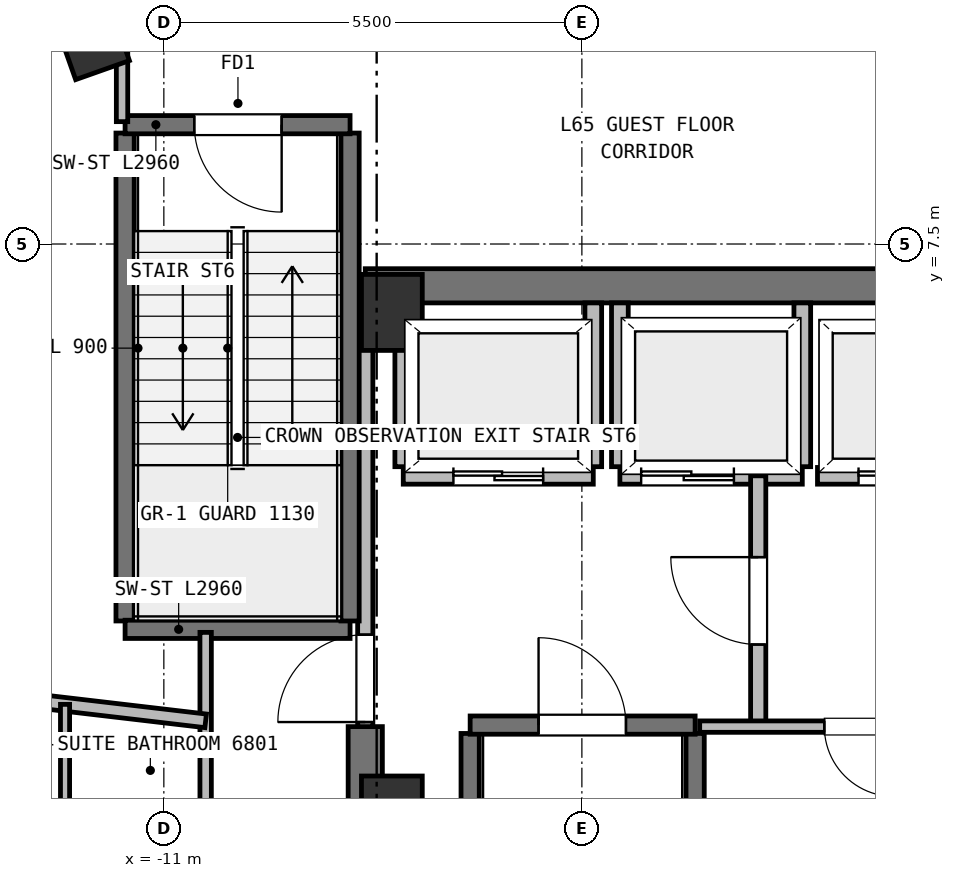
"""IFC4 building model, lengths in metres.
Left out: names, types, materials, properties, quantities, classifications, styles, units other than length and angle.
Written with IfcOpenShell. Run it as: python <this file> out.ifc"""

import sys

from ifc_helpers import new_model, si_unit, direction, frame, frame_2d, origin, origin_2d, place, context, subcontext, project, spatial, rectangle, extrude, element, fill, save


model = new_model("IFC4")
c1 = context("Model", 3, precision=1e-05, world=origin(), true_north=direction((0.0, 1.0)))
c2 = subcontext(c1, "Body", "Model", "MODEL_VIEW")
j1 = project(units=[si_unit("LENGTHUNIT", "METRE"), si_unit("PLANEANGLEUNIT", "RADIAN")], contexts=[c1])
p1 = place(None, origin())
s1 = spatial("IfcSite", under=j1, at=p1, CompositionType="ELEMENT")
p2 = place(p1, origin())
s2 = spatial("IfcBuilding", under=s1, at=p2, CompositionType="ELEMENT")
p3 = place(p2, frame((0.0, 0.0, 260.2)))
s3 = spatial("IfcBuildingStorey", under=s2, at=p3, CompositionType="ELEMENT", Elevation=260.2)
for number, where, z_axis, x_axis in (
    (1, (-8.0, 6.6, 0.0), (0.0, 0.0, 1.0), (1.0, 0.0, 0.0)),
    (2, (-8.0, 0.0, 0.0), (0.0, 0.0, 1.0), (1.0, 0.0, 0.0)),
):
    element("IfcColumn", number, at=place(p3, frame(where, z_axis=z_axis, x_axis=x_axis)), inside=s3, PredefinedType="COLUMN", context=c2, shape_type="SweptSolid", body=[
        extrude(rectangle(XDim=0.8, YDim=1.0, at=origin_2d()), origin(), (0.0, 0.0, 1.0), 4.2),
    ])
p4 = place(p3, frame((-8.35, 6.95, 0.0), z_axis=(0.0, 0.0, 1.0), x_axis=(1.0, 0.0, 0.0)))
e3 = element("IfcWall", 3, at=p4, inside=s3, PredefinedType="SHEAR", context=c2, shape_type="SweptSolid", body=[
    extrude(rectangle(XDim=16.7, YDim=0.45, at=frame_2d((8.35, 0.0))), origin(), (0.0, 0.0, 1.0), 3.95),
])
p5 = place(p3, frame((-8.35, -6.95, 0.0), z_axis=(0.0, 0.0, 1.0), x_axis=(0.0, 1.0, 0.0)))
e4 = element("IfcWall", 4, at=p5, inside=s3, PredefinedType="SHEAR", context=c2, shape_type="SweptSolid", body=[
    extrude(rectangle(XDim=8.1, YDim=0.45, at=frame_2d((4.05, 0.0))), origin(), (0.0, 0.0, 1.0), 3.95),
])
p6 = place(p3, frame((-11.957, 10.212, 0.0), z_axis=(0.0, 0.0, 1.0), x_axis=(0.942641491092, 0.333806859234, 0.0)))
e5 = element("IfcColumn", 5, at=p6, inside=s3, PredefinedType="COLUMN", context=c2, shape_type="SweptSolid", body=[
    extrude(rectangle(XDim=0.75, YDim=0.9, at=origin_2d()), origin(), (0.0, 0.0, 1.0), 4.2),
])
for number, where, z_axis, x_axis in (
    (6, (-6.97, -6.16, 0.0), (0.0, 0.0, 1.0), (0.0, 1.0, 0.0)),
    (7, (-4.01, -6.16, 0.0), (0.0, 0.0, 1.0), (0.0, 1.0, 0.0)),
):
    element("IfcWall", number, at=place(p3, frame(where, z_axis=z_axis, x_axis=x_axis)), inside=s3, PredefinedType="SHEAR", context=c2, shape_type="SweptSolid", body=[
        extrude(rectangle(XDim=7.22, YDim=0.24, at=frame_2d((3.61, 0.0))), origin(), (0.0, 0.0, 1.0), 3.95),
    ])
p7 = place(p3, frame((-6.97, 1.17, 0.0), z_axis=(0.0, 0.0, 1.0), x_axis=(1.0, 0.0, 0.0)))
e8 = element("IfcWall", 8, at=p7, inside=s3, PredefinedType="SHEAR", context=c2, shape_type="SweptSolid", body=[
    extrude(rectangle(XDim=2.96, YDim=0.24, at=frame_2d((1.48, 0.0))), origin(), (0.0, 0.0, 1.0), 3.95),
])
p8 = place(p7, frame((0.9, 0.0, 0.0)))
e9 = element("IfcOpeningElement", 9, at=p8, cuts=e8, PredefinedType="OPENING", context=c2, shape_type="SweptSolid", body=[
    extrude(rectangle(XDim=1.15, YDim=2.15, at=frame_2d((0.575, 1.075))), frame((0.0, 0.13, 0.0), z_axis=(0.0, -1.0, 0.0), x_axis=(1.0, 0.0, 0.0)), (0.0, 0.0, 1.0), 0.26),
])
p9 = place(p3, frame((-7.85, 4.45, 0.0), z_axis=(0.0, 0.0, 1.0), x_axis=(1.0, 0.0, 0.0)))
e10 = element("IfcWall", 10, at=p9, inside=s3, PredefinedType="PARTITIONING", context=c2, shape_type="SweptSolid", body=[
    extrude(rectangle(XDim=2.5, YDim=0.22, at=frame_2d((1.25, 0.0))), origin(), (0.0, 0.0, 1.0), 3.95),
])
p10 = place(p9, frame((0.66, 0.0, 0.0)))
e11 = element("IfcOpeningElement", 11, at=p10, cuts=e10, PredefinedType="OPENING", context=c2, shape_type="SweptSolid", body=[
    extrude(rectangle(XDim=1.18, YDim=2.15, at=frame_2d((0.59, 1.075))), frame((0.0, 0.12, 0.0), z_axis=(0.0, -1.0, 0.0), x_axis=(1.0, 0.0, 0.0)), (0.0, 0.0, 1.0), 0.24),
])
p11 = place(p3, frame((-7.85, 4.57, 0.0), z_axis=(0.0, 0.0, 1.0), x_axis=(0.0, 1.0, 0.0)))
e12 = element("IfcWall", 12, at=p11, inside=s3, PredefinedType="PARTITIONING", context=c2, shape_type="SweptSolid", body=[
    extrude(rectangle(XDim=2.155, YDim=0.22, at=frame_2d((1.078, 0.0))), origin(), (0.0, 0.0, 1.0), 3.63),
])
p12 = place(p3, frame((-5.35, 4.57, 0.0), z_axis=(0.0, 0.0, 1.0), x_axis=(0.0, 1.0, 0.0)))
e13 = element("IfcWall", 13, at=p12, inside=s3, PredefinedType="PARTITIONING", context=c2, shape_type="SweptSolid", body=[
    extrude(rectangle(XDim=2.155, YDim=0.22, at=frame_2d((1.078, 0.0))), origin(), (0.0, 0.0, 1.0), 3.95),
])
p13 = place(p3, frame((-5.0, 4.45, 0.0), z_axis=(0.0, 0.0, 1.0), x_axis=(1.0, 0.0, 0.0)))
e14 = element("IfcWall", 14, at=p13, inside=s3, PredefinedType="PARTITIONING", context=c2, shape_type="SweptSolid", body=[
    extrude(rectangle(XDim=2.4, YDim=0.22, at=frame_2d((1.2, 0.0))), origin(), (0.0, 0.0, 1.0), 3.95),
])
p14 = place(p13, frame((0.28, 0.0, 0.0)))
e15 = element("IfcOpeningElement", 15, at=p14, cuts=e14, PredefinedType="OPENING", context=c2, shape_type="SweptSolid", body=[
    extrude(rectangle(XDim=1.22, YDim=2.15, at=frame_2d((0.61, 1.075))), frame((0.0, 0.12, 0.0), z_axis=(0.0, -1.0, 0.0), x_axis=(1.0, 0.0, 0.0)), (0.0, 0.0, 1.0), 0.24),
])
for number, where, z_axis, x_axis in (
    (16, (-5.0, 4.57, 0.0), (0.0, 0.0, 1.0), (0.0, 1.0, 0.0)),
    (17, (-2.6, 4.57, 0.0), (0.0, 0.0, 1.0), (0.0, 1.0, 0.0)),
):
    element("IfcWall", number, at=place(p3, frame(where, z_axis=z_axis, x_axis=x_axis)), inside=s3, PredefinedType="PARTITIONING", context=c2, shape_type="SweptSolid", body=[
        extrude(rectangle(XDim=2.155, YDim=0.22, at=frame_2d((1.078, 0.0))), origin(), (0.0, 0.0, 1.0), 3.95),
    ])
p15 = place(p3, frame((-2.4, 4.45, 0.0), z_axis=(0.0, 0.0, 1.0), x_axis=(1.0, 0.0, 0.0)))
e18 = element("IfcWall", 18, at=p15, inside=s3, PredefinedType="PARTITIONING", context=c2, shape_type="SweptSolid", body=[
    extrude(rectangle(XDim=2.2, YDim=0.22, at=frame_2d((1.1, 0.0))), origin(), (0.0, 0.0, 1.0), 3.95),
])
p16 = place(p15, frame((0.54, 0.0, 0.0)))
e19 = element("IfcOpeningElement", 19, at=p16, cuts=e18, PredefinedType="OPENING", context=c2, shape_type="SweptSolid", body=[
    extrude(rectangle(XDim=1.12, YDim=2.15, at=frame_2d((0.56, 1.075))), frame((0.0, 0.12, 0.0), z_axis=(0.0, -1.0, 0.0), x_axis=(1.0, 0.0, 0.0)), (0.0, 0.0, 1.0), 0.24),
])
p17 = place(p3, frame((-3.18, 1.15, 0.0), z_axis=(0.0, 0.0, 1.0), x_axis=(0.0, 1.0, 0.0)))
e20 = element("IfcWall", 20, at=p17, inside=s3, PredefinedType="PARTITIONING", context=c2, shape_type="SweptSolid", body=[
    extrude(rectangle(XDim=3.3, YDim=0.2, at=frame_2d((1.65, 0.0))), origin(), (0.0, 0.0, 1.0), 3.95),
])
p18 = place(p17, frame((1.08, 0.0, 0.0)))
e21 = element("IfcOpeningElement", 21, at=p18, cuts=e20, PredefinedType="OPENING", context=c2, shape_type="SweptSolid", body=[
    extrude(rectangle(XDim=1.15, YDim=2.15, at=frame_2d((0.575, 1.075))), frame((0.0, 0.11, 0.0), z_axis=(0.0, -1.0, 0.0), x_axis=(1.0, 0.0, 0.0)), (0.0, 0.0, 1.0), 0.22),
])
p19 = place(p3, frame((-8.35, 1.15, 0.0), z_axis=(0.0, 0.0, 1.0), x_axis=(0.0, 1.0, 0.0)))
e22 = element("IfcWall", 22, at=p19, inside=s3, PredefinedType="PARTITIONING", context=c2, shape_type="SweptSolid", body=[
    extrude(rectangle(XDim=5.4, YDim=0.2, at=frame_2d((2.7, 0.0))), origin(), (0.0, 0.0, 1.0), 3.95),
])
p20 = place(p19, frame((0.06, 0.0, 0.0)))
e23 = element("IfcOpeningElement", 23, at=p20, cuts=e22, PredefinedType="OPENING", context=c2, shape_type="SweptSolid", body=[
    extrude(rectangle(XDim=1.15, YDim=2.15, at=frame_2d((0.575, 1.075))), frame((0.0, 0.11, 0.0), z_axis=(0.0, -1.0, 0.0), x_axis=(1.0, 0.0, 0.0)), (0.0, 0.0, 1.0), 0.22),
])
p21 = place(p3, frame((3.95, 1.15, 0.0), z_axis=(0.0, 0.0, 1.0), x_axis=(-1.0, 0.0, 0.0)))
e24 = element("IfcWall", 24, at=p21, inside=s3, PredefinedType="PARTITIONING", context=c2, shape_type="SweptSolid", body=[
    extrude(rectangle(XDim=7.9, YDim=0.15, at=frame_2d((3.95, 0.0))), origin(), (0.0, 0.0, 1.0), 3.95),
])
p22 = place(p21, frame((5.34, 0.0, 0.0)))
e25 = element("IfcOpeningElement", 25, at=p22, cuts=e24, PredefinedType="OPENING", context=c2, shape_type="SweptSolid", body=[
    extrude(rectangle(XDim=0.92, YDim=2.05, at=frame_2d((0.46, 1.025))), frame((0.0, 0.085, 0.0), z_axis=(0.0, -1.0, 0.0), x_axis=(1.0, 0.0, 0.0)), (0.0, 0.0, 1.0), 0.17),
])
p23 = place(p21, frame((1.84, 0.0, 0.0)))
e26 = element("IfcOpeningElement", 26, at=p23, cuts=e24, PredefinedType="OPENING", context=c2, shape_type="SweptSolid", body=[
    extrude(rectangle(XDim=0.92, YDim=2.05, at=frame_2d((0.46, 1.025))), frame((0.0, 0.085, 0.0), z_axis=(0.0, -1.0, 0.0), x_axis=(1.0, 0.0, 0.0)), (0.0, 0.0, 1.0), 0.17),
])
p24 = place(p3, frame((-11.51, 2.54, 0.0), z_axis=(0.0, 0.0, 1.0), x_axis=(0.0, 1.0, 0.0)))
e27 = element("IfcWall", 27, at=p24, inside=s3, PredefinedType="SHEAR", context=c2, shape_type="SweptSolid", body=[
    extrude(rectangle(XDim=6.42, YDim=0.24, at=frame_2d((3.21, 0.0))), origin(), (0.0, 0.0, 1.0), 3.95),
])
p25 = place(p3, frame((-11.51, 2.43, 0.0), z_axis=(0.0, 0.0, 1.0), x_axis=(1.0, 0.0, 0.0)))
e28 = element("IfcWall", 28, at=p25, inside=s3, PredefinedType="SHEAR", context=c2, shape_type="SweptSolid", body=[
    extrude(rectangle(XDim=2.96, YDim=0.24, at=frame_2d((1.48, 0.0))), origin(), (0.0, 0.0, 1.0), 3.95),
])
p26 = place(p3, frame((-8.55, 2.54, 0.0), z_axis=(0.0, 0.0, 1.0), x_axis=(0.0, 1.0, 0.0)))
e29 = element("IfcWall", 29, at=p26, inside=s3, PredefinedType="SHEAR", context=c2, shape_type="SweptSolid", body=[
    extrude(rectangle(XDim=6.42, YDim=0.24, at=frame_2d((3.21, 0.0))), origin(), (0.0, 0.0, 1.0), 3.95),
])
p27 = place(p3, frame((-8.55, 9.07, 0.0), z_axis=(0.0, 0.0, 1.0), x_axis=(-1.0, 0.0, 0.0)))
e30 = element("IfcWall", 30, at=p27, inside=s3, PredefinedType="SHEAR", context=c2, shape_type="SweptSolid", body=[
    extrude(rectangle(XDim=2.96, YDim=0.24, at=frame_2d((1.48, 0.0))), origin(), (0.0, 0.0, 1.0), 3.95),
])
p28 = place(p27, frame((0.9, 0.0, 0.0)))
e31 = element("IfcOpeningElement", 31, at=p28, cuts=e30, PredefinedType="OPENING", context=c2, shape_type="SweptSolid", body=[
    extrude(rectangle(XDim=1.15, YDim=2.15, at=frame_2d((0.575, 1.075))), frame((0.0, 0.13, 0.0), z_axis=(0.0, -1.0, 0.0), x_axis=(1.0, 0.0, 0.0)), (0.0, 0.0, 1.0), 0.26),
])
p29 = place(p3, frame((-11.55, 9.11, 0.0), z_axis=(0.0, 0.0, 1.0), x_axis=(0.0, 1.0, 0.0)))
e32 = element("IfcWall", 32, at=p29, inside=s3, PredefinedType="PARTITIONING", context=c2, shape_type="SweptSolid", body=[
    extrude(rectangle(XDim=1.37, YDim=0.15, at=frame_2d((0.685, 0.0))), origin(), (0.0, 0.0, 1.0), 3.95),
])
p30 = place(p3, frame((-10.45, -7.24, 0.0), z_axis=(0.0, 0.0, 1.0), x_axis=(0.0, 1.0, 0.0)))
e33 = element("IfcWall", 33, at=p30, inside=s3, PredefinedType="PARTITIONING", context=c2, shape_type="SweptSolid", body=[
    extrude(rectangle(XDim=9.63, YDim=0.15, at=frame_2d((4.815, 0.0))), origin(), (0.0, 0.0, 1.0), 3.95),
])
p31 = place(p30, frame((3.043, 0.0, 0.0)))
e34 = element("IfcOpeningElement", 34, at=p31, cuts=e33, PredefinedType="OPENING", context=c2, shape_type="SweptSolid", body=[
    extrude(rectangle(XDim=1.06, YDim=2.15, at=frame_2d((0.53, 1.075))), frame((0.0, 0.085, 0.0), z_axis=(0.0, -1.0, 0.0), x_axis=(1.0, 0.0, 0.0)), (0.0, 0.0, 1.0), 0.17),
])
p32 = place(p3, frame((-10.45, 1.226, 0.0), z_axis=(0.0, 0.0, 1.0), x_axis=(-0.993188711069, 0.116516883775, 0.0)))
e35 = element("IfcWall", 35, at=p32, inside=s3, PredefinedType="PARTITIONING", context=c2, shape_type="SweptSolid", body=[
    extrude(rectangle(XDim=10.525, YDim=0.18, at=frame_2d((5.262, 0.0))), origin(), (0.0, 0.0, 1.0), 3.95),
])
p33 = place(p3, frame((-12.3, -2.054, 0.0), z_axis=(0.0, 0.0, 1.0), x_axis=(0.0, 1.0, 0.0)))
e36 = element("IfcWall", 36, at=p33, inside=s3, PredefinedType="PARTITIONING", context=c2, shape_type="SweptSolid", body=[
    extrude(rectangle(XDim=3.497, YDim=0.12, at=frame_2d((1.749, 0.0))), origin(), (0.0, 0.0, 1.0), 3.95),
])
p34 = place(p33, frame((1.288, 0.0, 0.0)))
e37 = element("IfcOpeningElement", 37, at=p34, cuts=e36, PredefinedType="OPENING", context=c2, shape_type="SweptSolid", body=[
    extrude(rectangle(XDim=0.92, YDim=2.1, at=frame_2d((0.46, 1.05))), frame((0.0, 0.07, 0.0), z_axis=(0.0, -1.0, 0.0), x_axis=(1.0, 0.0, 0.0)), (0.0, 0.0, 1.0), 0.14),
])
p35 = place(p8, origin())
e38 = element("IfcDoor", 38, at=p35, inside=s3, OperationType="SINGLE_SWING_LEFT", PredefinedType="DOOR", context=c2, shape_type="SweptSolid", body=[
    extrude(rectangle(XDim=1.15, YDim=2.15, at=frame_2d((0.575, 1.075))), frame((0.0, 0.025, 0.0), z_axis=(0.0, -1.0, 0.0), x_axis=(1.0, 0.0, 0.0)), (0.0, 0.0, 1.0), 0.05),
])
fill(e9, e38)
p36 = place(p10, origin())
e39 = element("IfcDoor", 39, at=p36, inside=s3, OperationType="DOUBLE_DOOR_SLIDING", PredefinedType="DOOR", context=c2, shape_type="SweptSolid", body=[
    extrude(rectangle(XDim=1.18, YDim=2.15, at=frame_2d((0.59, 1.075))), frame((0.0, 0.025, 0.0), z_axis=(0.0, -1.0, 0.0), x_axis=(1.0, 0.0, 0.0)), (0.0, 0.0, 1.0), 0.05),
])
fill(e11, e39)
p37 = place(p14, origin())
e40 = element("IfcDoor", 40, at=p37, inside=s3, OperationType="DOUBLE_DOOR_SLIDING", PredefinedType="DOOR", context=c2, shape_type="SweptSolid", body=[
    extrude(rectangle(XDim=1.22, YDim=2.15, at=frame_2d((0.61, 1.075))), frame((0.0, 0.025, 0.0), z_axis=(0.0, -1.0, 0.0), x_axis=(1.0, 0.0, 0.0)), (0.0, 0.0, 1.0), 0.05),
])
fill(e15, e40)
p38 = place(p16, origin())
e41 = element("IfcDoor", 41, at=p38, inside=s3, OperationType="DOUBLE_DOOR_SLIDING", PredefinedType="DOOR", context=c2, shape_type="SweptSolid", body=[
    extrude(rectangle(XDim=1.12, YDim=2.15, at=frame_2d((0.56, 1.075))), frame((0.0, 0.025, 0.0), z_axis=(0.0, -1.0, 0.0), x_axis=(1.0, 0.0, 0.0)), (0.0, 0.0, 1.0), 0.05),
])
fill(e19, e41)
p39 = place(p18, origin())
e42 = element("IfcDoor", 42, at=p39, inside=s3, OperationType="SINGLE_SWING_RIGHT", PredefinedType="DOOR", context=c2, shape_type="SweptSolid", body=[
    extrude(rectangle(XDim=1.15, YDim=2.15, at=frame_2d((0.575, 1.075))), frame((0.0, 0.025, 0.0), z_axis=(0.0, -1.0, 0.0), x_axis=(1.0, 0.0, 0.0)), (0.0, 0.0, 1.0), 0.05),
])
fill(e21, e42)
p40 = place(p20, origin())
e43 = element("IfcDoor", 43, at=p40, inside=s3, OperationType="SINGLE_SWING_LEFT", PredefinedType="DOOR", context=c2, shape_type="SweptSolid", body=[
    extrude(rectangle(XDim=1.15, YDim=2.15, at=frame_2d((0.575, 1.075))), frame((0.0, 0.025, 0.0), z_axis=(0.0, -1.0, 0.0), x_axis=(1.0, 0.0, 0.0)), (0.0, 0.0, 1.0), 0.05),
])
fill(e23, e43)
p41 = place(p22, origin())
e44 = element("IfcDoor", 44, at=p41, inside=s3, OperationType="SINGLE_SWING_LEFT", PredefinedType="DOOR", context=c2, shape_type="SweptSolid", body=[
    extrude(rectangle(XDim=0.92, YDim=2.05, at=frame_2d((0.46, 1.025))), frame((0.0, 0.025, 0.0), z_axis=(0.0, -1.0, 0.0), x_axis=(1.0, 0.0, 0.0)), (0.0, 0.0, 1.0), 0.05),
])
fill(e25, e44)
p42 = place(p28, origin())
e45 = element("IfcDoor", 45, at=p42, inside=s3, OperationType="SINGLE_SWING_LEFT", PredefinedType="DOOR", context=c2, shape_type="SweptSolid", body=[
    extrude(rectangle(XDim=1.15, YDim=2.15, at=frame_2d((0.575, 1.075))), frame((0.0, 0.025, 0.0), z_axis=(0.0, -1.0, 0.0), x_axis=(1.0, 0.0, 0.0)), (0.0, 0.0, 1.0), 0.05),
])
fill(e31, e45)
save(model, sys.argv[1])
